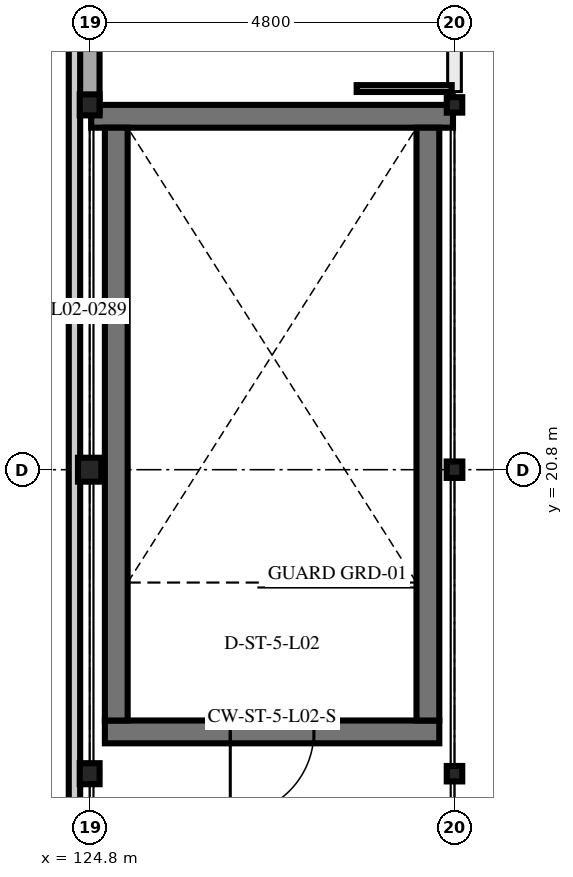
"""IFC4 building model, lengths in metres.
Left out: names, types, materials, properties, quantities, classifications, styles, units other than length and angle.
Written with IfcOpenShell. Run it as: python <this file> out.ifc"""

import sys

from ifc_helpers import new_model, si_unit, direction, frame, frame_2d, origin, origin_2d, place, context, subcontext, project, spatial, rectangle, i_section, extrude, element, fill, save


model = new_model("IFC4")
c1 = context("Model", 3, precision=1e-05, world=origin(), true_north=direction((0.0, 1.0)))
c2 = subcontext(c1, "Body", "Model", "MODEL_VIEW")
j1 = project(units=[si_unit("LENGTHUNIT", "METRE"), si_unit("PLANEANGLEUNIT", "RADIAN")], contexts=[c1])
p1 = place(None, origin())
s1 = spatial("IfcSite", under=j1, at=p1, CompositionType="ELEMENT")
p2 = place(p1, origin())
s2 = spatial("IfcBuilding", under=s1, at=p2, CompositionType="ELEMENT")
p3 = place(p2, frame((0.0, 0.0, 9.6)))
s3 = spatial("IfcBuildingStorey", under=s2, at=p3, CompositionType="ELEMENT", Elevation=9.6)
p4 = place(p3, frame((124.8, 20.8, 0.0), z_axis=(0.0, 0.0, 1.0), x_axis=(1.0, 0.0, 0.0)))
e1 = element("IfcColumn", 1, at=p4, inside=s3, PredefinedType="COLUMN", context=c2, shape_type="SweptSolid", body=[
    extrude(i_section(OverallWidth=0.307, OverallDepth=0.314, WebThickness=0.012, FlangeThickness=0.019, at=origin_2d()), origin(), (0.0, 0.0, 1.0), 4.5),
])
for number, where, z_axis, x_axis in (
    (2, (124.8, 16.8, 0.0), (0.0, 0.0, 1.0), (1.0, 0.0, 0.0)),
    (3, (124.8, 25.6, 0.0), (0.0, 0.0, 1.0), (1.0, 0.0, 0.0)),
):
    element("IfcColumn", number, at=place(p3, frame(where, z_axis=z_axis, x_axis=x_axis)), inside=s3, PredefinedType="COLUMN", context=c2, shape_type="SweptSolid", body=[
        extrude(i_section(OverallWidth=0.261, OverallDepth=0.276, WebThickness=0.015, FlangeThickness=0.025, at=origin_2d()), origin(), (0.0, 0.0, 1.0), 4.5),
    ])
p5 = place(p3, frame((129.6, 20.8, 0.0), z_axis=(0.0, 0.0, 1.0), x_axis=(1.0, 0.0, 0.0)))
e4 = element("IfcColumn", 4, at=p5, inside=s3, PredefinedType="COLUMN", context=c2, shape_type="SweptSolid", body=[
    extrude(i_section(OverallWidth=0.206, OverallDepth=0.216, WebThickness=0.01, FlangeThickness=0.017, at=origin_2d()), origin(), (0.0, 0.0, 1.0), 4.5),
])
for number, where, z_axis, x_axis in (
    (5, (129.6, 16.8, 0.0), (0.0, 0.0, 1.0), (1.0, 0.0, 0.0)),
    (6, (129.6, 25.6, 0.0), (0.0, 0.0, 1.0), (1.0, 0.0, 0.0)),
):
    element("IfcColumn", number, at=place(p3, frame(where, z_axis=z_axis, x_axis=x_axis)), inside=s3, PredefinedType="COLUMN", context=c2, shape_type="SweptSolid", body=[
        extrude(i_section(OverallWidth=0.204, OverallDepth=0.203, WebThickness=0.007, FlangeThickness=0.011, at=origin_2d()), origin(), (0.0, 0.0, 1.0), 4.5),
    ])
p6 = place(p3, frame((129.4, 17.35, 0.0), z_axis=(0.0, 0.0, 1.0), x_axis=(-1.0, 0.0, 0.0)))
e7 = element("IfcWall", 7, at=p6, inside=s3, PredefinedType="SHEAR", context=c2, shape_type="SweptSolid", body=[
    extrude(rectangle(XDim=4.4, YDim=0.3, at=frame_2d((2.2, 0.0))), origin(), (0.0, 0.0, 1.0), 4.255),
])
p7 = place(p6, frame((1.65, 0.0, 0.0)))
e8 = element("IfcOpeningElement", 8, at=p7, cuts=e7, PredefinedType="OPENING", context=c2, shape_type="SweptSolid", body=[
    extrude(rectangle(XDim=1.1, YDim=2.2, at=frame_2d((0.55, 1.1))), frame((0.0, 0.16, 0.0), z_axis=(0.0, -1.0, 0.0), x_axis=(1.0, 0.0, 0.0)), (0.0, 0.0, 1.0), 0.32),
])
p8 = place(p3, frame((124.82, 25.45, 0.0), z_axis=(0.0, 0.0, 1.0), x_axis=(1.0, 0.0, 0.0)))
e9 = element("IfcWall", 9, at=p8, inside=s3, PredefinedType="SHEAR", context=c2, shape_type="SweptSolid", body=[
    extrude(rectangle(XDim=4.76, YDim=0.3, at=frame_2d((2.38, 0.0))), origin(), (0.0, 0.0, 1.0), 4.255),
])
for number, where, z_axis, x_axis in (
    (10, (125.15, 17.5, 0.0), (0.0, 0.0, 1.0), (0.0, 1.0, 0.0)),
    (11, (129.25, 25.3, 0.0), (0.0, 0.0, 1.0), (0.0, -1.0, 0.0)),
):
    element("IfcWall", number, at=place(p3, frame(where, z_axis=z_axis, x_axis=x_axis)), inside=s3, PredefinedType="SHEAR", context=c2, shape_type="SweptSolid", body=[
        extrude(rectangle(XDim=7.8, YDim=0.3, at=frame_2d((3.9, 0.0))), origin(), (0.0, 0.0, 1.0), 4.255),
    ])
p9 = place(p3, frame((124.8, 33.685, 0.0), z_axis=(0.0, 0.0, 1.0), x_axis=(0.0, -1.0, 0.0)))
e12 = element("IfcWall", 12, at=p9, inside=s3, PredefinedType="SOLIDWALL", context=c2, shape_type="SweptSolid", body=[
    extrude(rectangle(XDim=8.17, YDim=0.26, at=frame_2d((4.085, 0.0))), origin(), (0.0, 0.0, 1.0), 3.775),
])
p10 = place(p3, frame((124.6, 11.825, 0.0), z_axis=(0.0, 0.0, 1.0), x_axis=(0.0, 1.0, 0.0)))
e13 = element("IfcWall", 13, at=p10, inside=s3, PredefinedType="PARTITIONING", context=c2, shape_type="SweptSolid", body=[
    extrude(rectangle(XDim=21.735, YDim=0.15, at=frame_2d((10.868, 0.0))), origin(), (0.0, 0.0, 1.0), 3.775),
])
p11 = place(p7, origin())
e14 = element("IfcDoor", 14, at=p11, inside=s3, OperationType="SINGLE_SWING_RIGHT", PredefinedType="DOOR", context=c2, shape_type="SweptSolid", body=[
    extrude(rectangle(XDim=1.1, YDim=2.2, at=frame_2d((0.55, 1.1))), frame((0.0, 0.025, 0.0), z_axis=(0.0, -1.0, 0.0), x_axis=(1.0, 0.0, 0.0)), (0.0, 0.0, 1.0), 0.05),
])
fill(e8, e14)
save(model, sys.argv[1])
